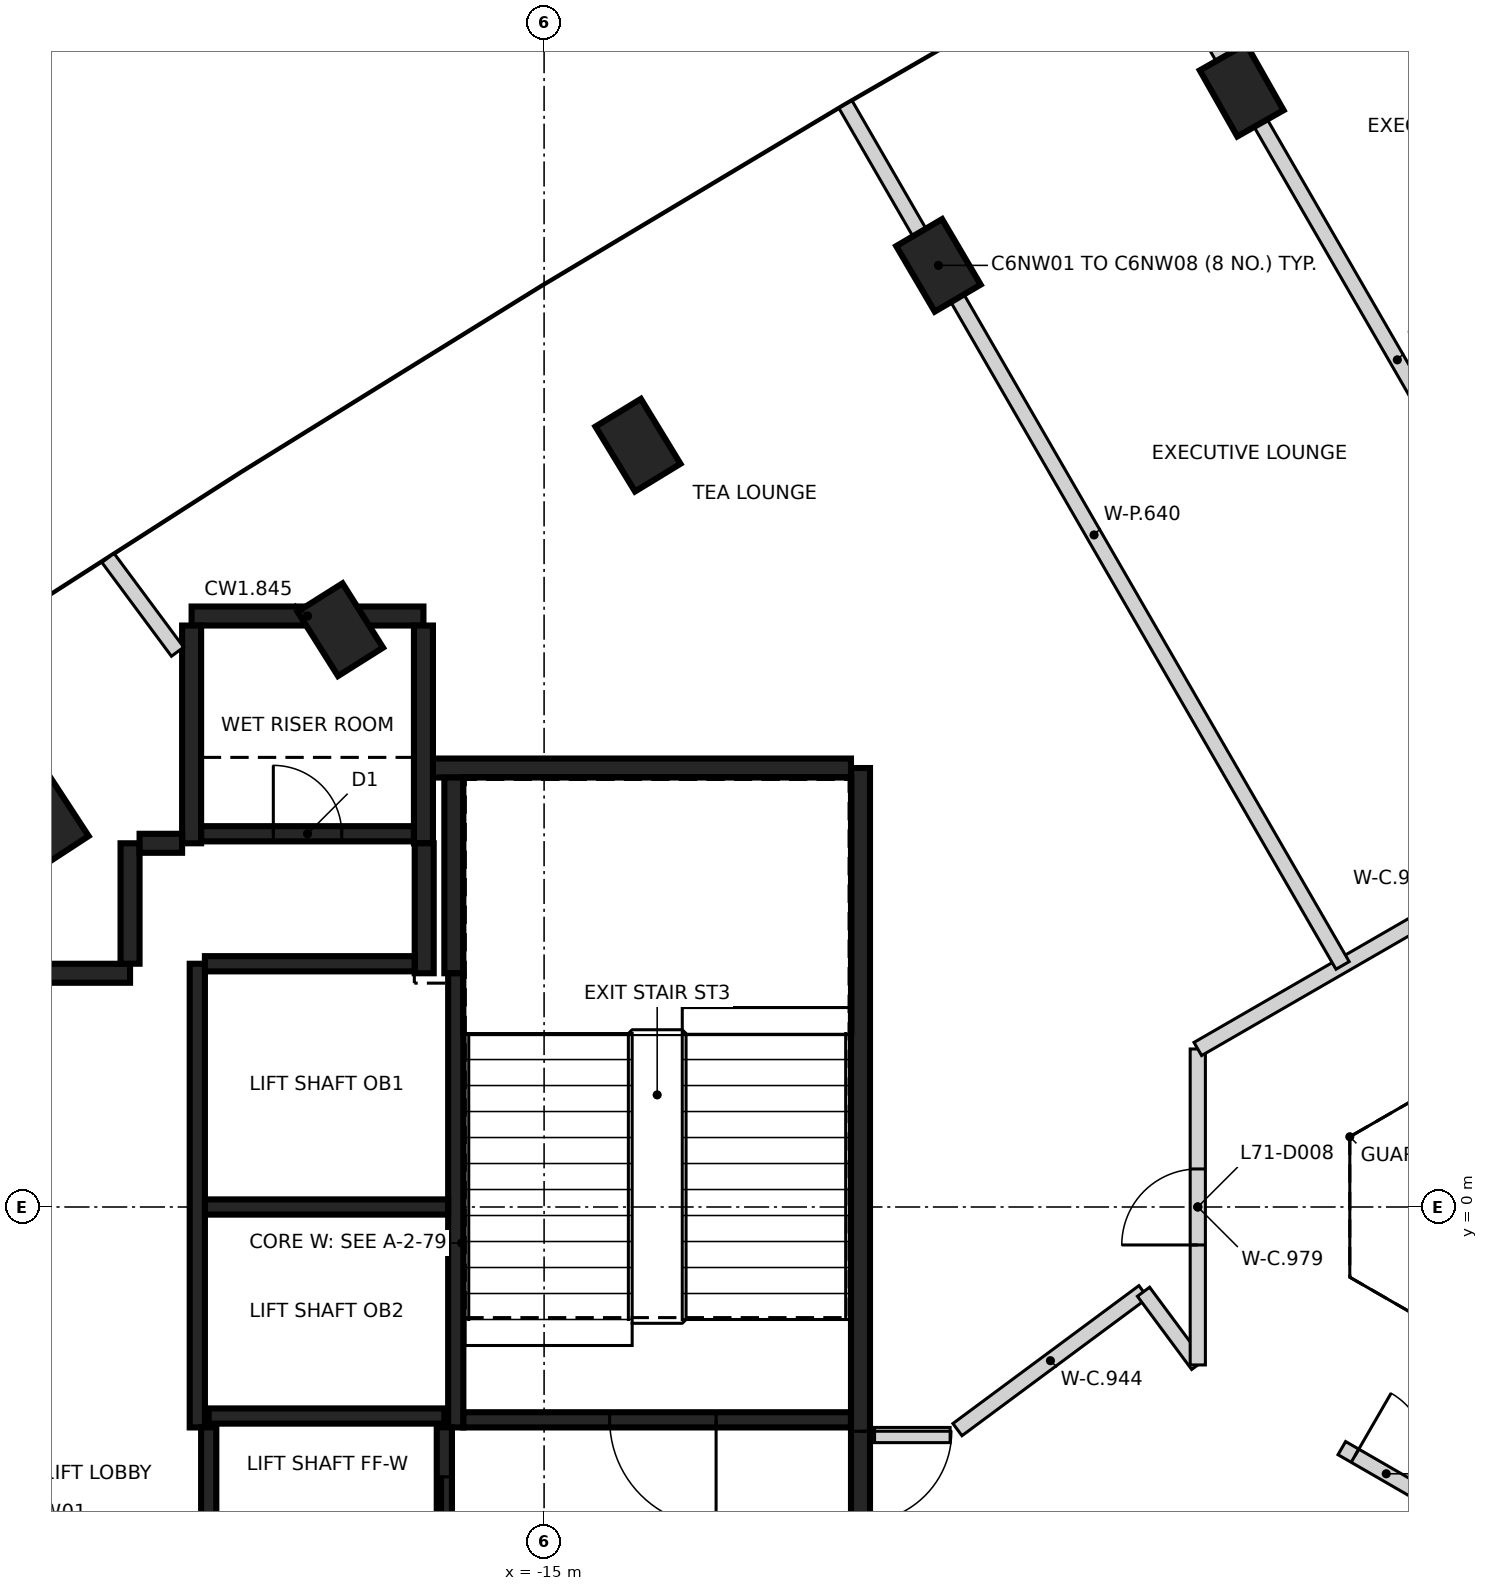
"""IFC4 building model, lengths in metres.
Left out: names, types, materials, properties, quantities, classifications, styles, units other than length and angle.
Written with IfcOpenShell. Run it as: python <this file> out.ifc"""

import sys

from ifc_helpers import new_model, si_unit, direction, frame, frame_2d, origin, origin_2d, place, context, subcontext, project, spatial, rectangle, extrude, element, fill, save


model = new_model("IFC4")
c1 = context("Model", 3, precision=1e-05, world=origin(), true_north=direction((0.0, 1.0)))
c2 = subcontext(c1, "Body", "Model", "MODEL_VIEW")
j1 = project(units=[si_unit("LENGTHUNIT", "METRE"), si_unit("PLANEANGLEUNIT", "RADIAN")], contexts=[c1])
p1 = place(None, origin())
s1 = spatial("IfcSite", under=j1, at=p1, CompositionType="ELEMENT")
p2 = place(p1, origin())
s2 = spatial("IfcBuilding", under=s1, at=p2, CompositionType="ELEMENT")
p3 = place(p2, frame((0.0, 0.0, 280.2)))
s3 = spatial("IfcBuildingStorey", under=s2, at=p3, CompositionType="ELEMENT", Elevation=280.2)
for number, where, z_axis, x_axis in (
    (1, (-5.822, 14.691, -0.35), (0.0, 0.0, 1.0), (-0.493, 0.87, 0.0)),
    (2, (-9.812, 12.388, -0.35), (0.0, 0.0, 1.0), (-0.507, 0.862, 0.0)),
    (3, (-13.765, 10.022, -0.35), (0.0, 0.0, 1.0), (-0.52, 0.854, 0.0)),
    (4, (-17.681, 7.595, -0.35), (0.0, 0.0, 1.0), (-0.533, 0.846, 0.0)),
    (5, (-21.559, 5.107, -0.35), (0.0, 0.0, 1.0), (-0.547, 0.837, 0.0)),
):
    element("IfcColumn", number, at=place(p3, frame(where, z_axis=z_axis, x_axis=x_axis)), inside=s3, PredefinedType="COLUMN", context=c2, shape_type="SweptSolid", body=[
        extrude(rectangle(XDim=1.0, YDim=0.7, at=origin_2d()), origin(), (0.0, 0.0, 1.0), 3.6),
    ])
p4 = place(p3, frame((-10.837, 5.775, 0.0), z_axis=(0.0, 0.0, 1.0), x_axis=(0.0, -1.0, 0.0)))
e6 = element("IfcWall", 6, at=p4, inside=s3, PredefinedType="SHEAR", context=c2, shape_type="SweptSolid", body=[
    extrude(rectangle(XDim=11.55, YDim=0.25, at=frame_2d((5.775, 0.0))), origin(), (0.0, 0.0, 1.0), 3.25),
])
p5 = place(p4, frame((10.025, 0.0, 0.0)))
e7 = element("IfcOpeningElement", 7, at=p5, cuts=e6, PredefinedType="OPENING", context=c2, shape_type="SweptSolid", body=[
    extrude(rectangle(XDim=1.2, YDim=2.1, at=frame_2d((0.6, 1.05))), frame((0.0, 0.135, 0.0), z_axis=(0.0, -1.0, 0.0), x_axis=(1.0, 0.0, 0.0)), (0.0, 0.0, 1.0), 0.27),
])
p6 = place(p4, frame((8.725, 0.0, 0.0)))
e8 = element("IfcOpeningElement", 8, at=p6, cuts=e6, PredefinedType="OPENING", context=c2, shape_type="SweptSolid", body=[
    extrude(rectangle(XDim=1.2, YDim=2.1, at=frame_2d((0.6, 1.05))), frame((0.0, 0.135, 0.0), z_axis=(0.0, -1.0, 0.0), x_axis=(1.0, 0.0, 0.0)), (0.0, 0.0, 1.0), 0.27),
])
p7 = place(p3, frame((-16.472, 5.775, 0.0), z_axis=(0.0, 0.0, 1.0), x_axis=(1.0, 0.0, 0.0)))
e9 = element("IfcWall", 9, at=p7, inside=s3, PredefinedType="SHEAR", context=c2, shape_type="SweptSolid", body=[
    extrude(rectangle(XDim=5.51, YDim=0.25, at=frame_2d((2.755, 0.0))), origin(), (0.0, 0.0, 1.0), 3.25),
])
p8 = place(p3, frame((-19.637, 7.775, 0.0), z_axis=(0.0, 0.0, 1.0), x_axis=(1.0, 0.0, 0.0)))
e10 = element("IfcWall", 10, at=p8, inside=s3, PredefinedType="SHEAR", context=c2, shape_type="SweptSolid", body=[
    extrude(rectangle(XDim=3.05, YDim=0.25, at=frame_2d((1.525, 0.0))), origin(), (0.0, 0.0, 1.0), 3.25),
])
for number, where, z_axis, x_axis in (
    (11, (-16.587, 7.65, 0.0), (0.0, 0.0, 1.0), (0.0, -1.0, 0.0)),
    (12, (-19.637, 4.785, 0.0), (0.0, 0.0, 1.0), (0.0, 1.0, 0.0)),
):
    element("IfcWall", number, at=place(p3, frame(where, z_axis=z_axis, x_axis=x_axis)), inside=s3, PredefinedType="SHEAR", context=c2, shape_type="SweptSolid", body=[
        extrude(rectangle(XDim=2.865, YDim=0.25, at=frame_2d((1.432, 0.0))), origin(), (0.0, 0.0, 1.0), 3.25),
    ])
p9 = place(p3, frame((-16.187, 3.075, 0.0), z_axis=(0.0, 0.0, 1.0), x_axis=(0.0, 1.0, 0.0)))
e13 = element("IfcWall", 13, at=p9, inside=s3, PredefinedType="SHEAR", context=c2, shape_type="SweptSolid", body=[
    extrude(rectangle(XDim=2.575, YDim=0.25, at=frame_2d((1.287, 0.0))), origin(), (0.0, 0.0, 1.0), 3.25),
])
p10 = place(p3, frame((-22.312, 3.075, 0.0), z_axis=(0.0, 0.0, 1.0), x_axis=(1.0, 0.0, 0.0)))
e14 = element("IfcWall", 14, at=p10, inside=s3, PredefinedType="SHEAR", context=c2, shape_type="SweptSolid", body=[
    extrude(rectangle(XDim=1.865, YDim=0.25, at=frame_2d((0.932, 0.0))), origin(), (0.0, 0.0, 1.0), 3.25),
])
p11 = place(p3, frame((-16.577, 4.785, 0.0), z_axis=(0.0, 0.0, 1.0), x_axis=(0.0, -1.0, 0.0)))
e15 = element("IfcWall", 15, at=p11, inside=s3, PredefinedType="SHEAR", context=c2, shape_type="SweptSolid", body=[
    extrude(rectangle(XDim=1.71, YDim=0.25, at=frame_2d((0.855, 0.0))), origin(), (0.0, 0.0, 1.0), 3.25),
])
p12 = place(p3, frame((-20.447, 3.2, 0.0), z_axis=(0.0, 0.0, 1.0), x_axis=(0.0, 1.0, 0.0)))
e16 = element("IfcWall", 16, at=p12, inside=s3, PredefinedType="SHEAR", context=c2, shape_type="SweptSolid", body=[
    extrude(rectangle(XDim=1.584, YDim=0.25, at=frame_2d((0.792, 0.0))), origin(), (0.0, 0.0, 1.0), 3.25),
])
p13 = place(p3, frame((-20.322, 4.785, 0.0), z_axis=(0.0, 0.0, 1.0), x_axis=(1.0, 0.0, 0.0)))
e17 = element("IfcWall", 17, at=p13, inside=s3, PredefinedType="SHEAR", context=c2, shape_type="SweptSolid", body=[
    extrude(rectangle(XDim=0.559, YDim=0.25, at=frame_2d((0.28, 0.0))), origin(), (0.0, 0.0, 1.0), 3.25),
])
p14 = place(p3, frame((-16.162, 3.074, 0.0), z_axis=(0.0, 0.0, 1.0), x_axis=(0.0, -1.0, 0.0)))
e18 = element("IfcWall", 18, at=p14, inside=s3, PredefinedType="SHEAR", context=c2, shape_type="SweptSolid", body=[
    extrude(rectangle(XDim=5.974, YDim=0.2, at=frame_2d((2.987, 0.0))), origin(), (0.0, 0.0, 1.0), 3.25),
])
p15 = place(p3, frame((-19.562, -2.9, 0.0), z_axis=(0.0, 0.0, 1.0), x_axis=(0.0, 1.0, 0.0)))
e19 = element("IfcWall", 19, at=p15, inside=s3, PredefinedType="SHEAR", context=c2, shape_type="SweptSolid", body=[
    extrude(rectangle(XDim=6.1, YDim=0.2, at=frame_2d((3.05, 0.0))), origin(), (0.0, 0.0, 1.0), 3.25),
])
p16 = place(p3, frame((-10.963, -2.8, 0.0), z_axis=(0.0, 0.0, 1.0), x_axis=(-1.0, 0.0, 0.0)))
e20 = element("IfcWall", 20, at=p16, inside=s3, PredefinedType="SHEAR", context=c2, shape_type="SweptSolid", body=[
    extrude(rectangle(XDim=5.098, YDim=0.2, at=frame_2d((2.549, 0.0))), origin(), (0.0, 0.0, 1.0), 3.25),
])
p17 = place(p16, frame((1.774, 0.0, 0.0)))
e21 = element("IfcOpeningElement", 21, at=p17, cuts=e20, PredefinedType="OPENING", context=c2, shape_type="SweptSolid", body=[
    extrude(rectangle(XDim=1.4, YDim=2.1, at=frame_2d((0.7, 1.05))), frame((0.0, 0.11, 0.0), z_axis=(0.0, -1.0, 0.0), x_axis=(1.0, 0.0, 0.0)), (0.0, 0.0, 1.0), 0.22),
])
p18 = place(p3, frame((-16.263, 0.0, 0.0), z_axis=(0.0, 0.0, 1.0), x_axis=(-1.0, 0.0, 0.0)))
e22 = element("IfcWall", 22, at=p18, inside=s3, PredefinedType="SHEAR", context=c2, shape_type="SweptSolid", body=[
    extrude(rectangle(XDim=3.198, YDim=0.2, at=frame_2d((1.599, 0.0))), origin(), (0.0, 0.0, 1.0), 3.25),
])
p19 = place(p3, frame((-19.511, 4.91, 0.0), z_axis=(0.0, 0.0, 1.0), x_axis=(1.0, 0.0, 0.0)))
e23 = element("IfcWall", 23, at=p19, inside=s3, PredefinedType="SHEAR", context=c2, shape_type="SweptSolid", body=[
    extrude(rectangle(XDim=2.798, YDim=0.2, at=frame_2d((1.399, 0.0))), origin(), (0.0, 0.0, 1.0), 3.25),
])
p20 = place(p19, frame((0.949, 0.0, 0.0)))
e24 = element("IfcOpeningElement", 24, at=p20, cuts=e23, PredefinedType="OPENING", context=c2, shape_type="SweptSolid", body=[
    extrude(rectangle(XDim=0.9, YDim=2.1, at=frame_2d((0.45, 1.05))), frame((0.0, 0.11, 0.0), z_axis=(0.0, -1.0, 0.0), x_axis=(1.0, 0.0, 0.0)), (0.0, 0.0, 1.0), 0.22),
])
p21 = place(p3, frame((-19.462, 3.2, 0.0), z_axis=(0.0, 0.0, 1.0), x_axis=(1.0, 0.0, 0.0)))
e25 = element("IfcWall", 25, at=p21, inside=s3, PredefinedType="SHEAR", context=c2, shape_type="SweptSolid", body=[
    extrude(rectangle(XDim=2.759, YDim=0.2, at=frame_2d((1.379, 0.0))), origin(), (0.0, 0.0, 1.0), 3.25),
])
p22 = place(p3, frame((-19.412, -2.75, 0.0), z_axis=(0.0, 0.0, 1.0), x_axis=(1.0, 0.0, 0.0)))
e26 = element("IfcWall", 26, at=p22, inside=s3, PredefinedType="SHEAR", context=c2, shape_type="SweptSolid", body=[
    extrude(rectangle(XDim=3.1, YDim=0.2, at=frame_2d((1.55, 0.0))), origin(), (0.0, 0.0, 1.0), 3.25),
])
p23 = place(p3, frame((-16.312, -2.898, 0.0), z_axis=(0.0, 0.0, 1.0), x_axis=(0.0, -1.0, 0.0)))
e27 = element("IfcWall", 27, at=p23, inside=s3, PredefinedType="SHEAR", context=c2, shape_type="SweptSolid", body=[
    extrude(rectangle(XDim=2.651, YDim=0.2, at=frame_2d((1.325, 0.0))), origin(), (0.0, 0.0, 1.0), 3.25),
])
p24 = place(p23, frame((0.652, 0.0, 0.0)))
e28 = element("IfcOpeningElement", 28, at=p24, cuts=e27, PredefinedType="OPENING", context=c2, shape_type="SweptSolid", body=[
    extrude(rectangle(XDim=1.3, YDim=2.1, at=frame_2d((0.65, 1.05))), frame((0.0, 0.11, 0.0), z_axis=(0.0, -1.0, 0.0), x_axis=(1.0, 0.0, 0.0)), (0.0, 0.0, 1.0), 0.22),
])
p25 = place(p3, frame((-19.412, -5.549, 0.0), z_axis=(0.0, 0.0, 1.0), x_axis=(0.0, 1.0, 0.0)))
e29 = element("IfcWall", 29, at=p25, inside=s3, PredefinedType="SHEAR", context=c2, shape_type="SweptSolid", body=[
    extrude(rectangle(XDim=2.651, YDim=0.2, at=frame_2d((1.325, 0.0))), origin(), (0.0, 0.0, 1.0), 3.25),
])
p26 = place(p3, frame((-10.652, -3.0, 0.0), z_axis=(0.0, 0.0, 1.0), x_axis=(1.0, 0.0, 0.0)))
e30 = element("IfcWall", 30, at=p26, inside=s3, PredefinedType="PARTITIONING", context=c2, shape_type="SweptSolid", body=[
    extrude(rectangle(XDim=0.994, YDim=0.2, at=frame_2d((0.497, 0.0))), origin(), (0.0, 0.0, 1.0), 3.25),
])
p27 = place(p3, frame((-7.115, -1.115, 0.0), z_axis=(0.0, 0.0, 1.0), x_axis=(-0.803344165632, -0.595515030495, 0.0)))
e31 = element("IfcWall", 31, at=p27, inside=s3, PredefinedType="PARTITIONING", context=c2, shape_type="SweptSolid", body=[
    extrude(rectangle(XDim=3.046, YDim=0.2, at=frame_2d((1.523, 0.0))), origin(), (0.0, 0.0, 1.0), 3.25),
])
p28 = place(p3, frame((-7.114, -1.115, 0.0), z_axis=(0.0, 0.0, 1.0), x_axis=(0.595690139668, -0.803214328496, 0.0)))
e32 = element("IfcWall", 32, at=p28, inside=s3, PredefinedType="PARTITIONING", context=c2, shape_type="SweptSolid", body=[
    extrude(rectangle(XDim=1.199, YDim=0.2, at=frame_2d((0.599, 0.0))), origin(), (0.0, 0.0, 1.0), 3.25),
])
p29 = place(p3, frame((-6.4, -2.078, 0.0), z_axis=(0.0, 0.0, 1.0), x_axis=(0.0, 1.0, 0.0)))
e33 = element("IfcWall", 33, at=p29, inside=s3, PredefinedType="PARTITIONING", context=c2, shape_type="SweptSolid", body=[
    extrude(rectangle(XDim=4.157, YDim=0.2, at=frame_2d((2.079, 0.0))), origin(), (0.0, 0.0, 1.0), 3.25),
])
p30 = place(p29, frame((1.579, 0.0, 0.0)))
e34 = element("IfcOpeningElement", 34, at=p30, cuts=e33, PredefinedType="OPENING", context=c2, shape_type="SweptSolid", body=[
    extrude(rectangle(XDim=1.0, YDim=2.1, at=frame_2d((0.5, 1.05))), frame((0.0, 0.11, 0.0), z_axis=(0.0, -1.0, 0.0), x_axis=(1.0, 0.0, 0.0)), (0.0, 0.0, 1.0), 0.22),
])
p31 = place(p3, frame((-6.4, 2.079, 0.0), z_axis=(0.0, 0.0, 1.0), x_axis=(0.866044821263, 0.499966366432, 0.0)))
e35 = element("IfcWall", 35, at=p31, inside=s3, PredefinedType="PARTITIONING", context=c2, shape_type="SweptSolid", body=[
    extrude(rectangle(XDim=8.953, YDim=0.2, at=frame_2d((4.477, 0.0))), origin(), (0.0, 0.0, 1.0), 3.25),
])
p32 = place(p31, frame((4.003, 0.0, 0.0)))
e36 = element("IfcOpeningElement", 36, at=p32, cuts=e35, PredefinedType="OPENING", context=c2, shape_type="SweptSolid", body=[
    extrude(rectangle(XDim=1.0, YDim=2.1, at=frame_2d((0.5, 1.05))), frame((0.0, 0.11, 0.0), z_axis=(0.0, -1.0, 0.0), x_axis=(1.0, 0.0, 0.0)), (0.0, 0.0, 1.0), 0.22),
])
p33 = place(p3, frame((-4.505, -3.172, 0.0), z_axis=(0.0, 0.0, 1.0), x_axis=(0.865815783666, -0.500362897061, 0.0)))
e37 = element("IfcWall", 37, at=p33, inside=s3, PredefinedType="PARTITIONING", context=c2, shape_type="SweptSolid", body=[
    extrude(rectangle(XDim=6.819, YDim=0.2, at=frame_2d((3.409, 0.0))), origin(), (0.0, 0.0, 1.0), 3.25),
])
p34 = place(p33, frame((0.2, 0.0, 0.0)))
e38 = element("IfcOpeningElement", 38, at=p34, cuts=e37, PredefinedType="OPENING", context=c2, shape_type="SweptSolid", body=[
    extrude(rectangle(XDim=0.95, YDim=2.1, at=frame_2d((0.475, 1.05))), frame((0.0, 0.11, 0.0), z_axis=(0.0, -1.0, 0.0), x_axis=(1.0, 0.0, 0.0)), (0.0, 0.0, 1.0), 0.22),
])
p35 = place(p3, frame((-20.738, 8.539, 0.0), z_axis=(0.0, 0.0, 1.0), x_axis=(0.595694844153, -0.803210839475, 0.0)))
e39 = element("IfcWall", 39, at=p35, inside=s3, PredefinedType="PARTITIONING", context=c2, shape_type="SweptSolid", body=[
    extrude(rectangle(XDim=1.536, YDim=0.2, at=frame_2d((0.768, 0.0))), origin(), (0.0, 0.0, 1.0), 3.25),
])
p36 = place(p3, frame((-11.035, 14.505, 0.0), z_axis=(0.0, 0.0, 1.0), x_axis=(0.499989597041, -0.866031409852, 0.0)))
e40 = element("IfcWall", 40, at=p36, inside=s3, PredefinedType="PARTITIONING", context=c2, shape_type="SweptSolid", body=[
    extrude(rectangle(XDim=13.079, YDim=0.2, at=frame_2d((6.54, 0.0))), origin(), (0.0, 0.0, 1.0), 3.25),
])
p37 = place(p3, frame((-7.044, 16.809, 0.0), z_axis=(0.0, 0.0, 1.0), x_axis=(0.499997679687, -0.866026743414, 0.0)))
e41 = element("IfcWall", 41, at=p37, inside=s3, PredefinedType="PARTITIONING", context=c2, shape_type="SweptSolid", body=[
    extrude(rectangle(XDim=13.079, YDim=0.2, at=frame_2d((6.54, 0.0))), origin(), (0.0, 0.0, 1.0), 3.25),
])
p38 = place(p3, frame((-4.303, -6.06, 0.0), z_axis=(0.0, 0.0, 1.0), x_axis=(0.500045362686, 0.865999212041, 0.0)))
e42 = element("IfcWall", 42, at=p38, inside=s3, PredefinedType="PARTITIONING", context=c2, shape_type="SweptSolid", body=[
    extrude(rectangle(XDim=2.4, YDim=0.15, at=frame_2d((1.2, 0.0))), origin(), (0.0, 0.0, 1.0), 3.25),
])
p39 = place(p38, frame((0.8, 0.0, 0.0)))
e43 = element("IfcOpeningElement", 43, at=p39, cuts=e42, PredefinedType="OPENING", context=c2, shape_type="SweptSolid", body=[
    extrude(rectangle(XDim=0.8, YDim=2.1, at=frame_2d((0.4, 1.05))), frame((0.0, 0.085, 0.0), z_axis=(0.0, -1.0, 0.0), x_axis=(1.0, 0.0, 0.0)), (0.0, 0.0, 1.0), 0.17),
])
p40 = place(p24, origin())
e44 = element("IfcDoor", 44, at=p40, inside=s3, OperationType="SLIDING_TO_LEFT", PredefinedType="DOOR", context=c2, shape_type="SweptSolid", body=[
    extrude(rectangle(XDim=1.3, YDim=2.1, at=frame_2d((0.65, 1.05))), frame((0.0, 0.025, 0.0), z_axis=(0.0, -1.0, 0.0), x_axis=(1.0, 0.0, 0.0)), (0.0, 0.0, 1.0), 0.05),
])
fill(e28, e44)
p41 = place(p6, origin())
e45 = element("IfcDoor", 45, at=p41, inside=s3, OperationType="SINGLE_SWING_RIGHT", PredefinedType="DOOR", context=c2, shape_type="SweptSolid", body=[
    extrude(rectangle(XDim=1.2, YDim=2.1, at=frame_2d((0.6, 1.05))), frame((0.0, 0.025, 0.0), z_axis=(0.0, -1.0, 0.0), x_axis=(1.0, 0.0, 0.0)), (0.0, 0.0, 1.0), 0.05),
])
fill(e8, e45)
p42 = place(p17, origin())
e46 = element("IfcDoor", 46, at=p42, inside=s3, OperationType="SINGLE_SWING_LEFT", PredefinedType="DOOR", context=c2, shape_type="SweptSolid", body=[
    extrude(rectangle(XDim=1.4, YDim=2.1, at=frame_2d((0.7, 1.05))), frame((0.0, 0.025, 0.0), z_axis=(0.0, -1.0, 0.0), x_axis=(1.0, 0.0, 0.0)), (0.0, 0.0, 1.0), 0.05),
])
fill(e21, e46)
p43 = place(p20, origin())
e47 = element("IfcDoor", 47, at=p43, inside=s3, OperationType="SINGLE_SWING_RIGHT", PredefinedType="DOOR", context=c2, shape_type="SweptSolid", body=[
    extrude(rectangle(XDim=0.9, YDim=2.1, at=frame_2d((0.45, 1.05))), frame((0.0, 0.025, 0.0), z_axis=(0.0, -1.0, 0.0), x_axis=(1.0, 0.0, 0.0)), (0.0, 0.0, 1.0), 0.05),
])
fill(e24, e47)
p44 = place(p30, origin())
e48 = element("IfcDoor", 48, at=p44, inside=s3, OperationType="SINGLE_SWING_LEFT", PredefinedType="DOOR", context=c2, shape_type="SweptSolid", body=[
    extrude(rectangle(XDim=1.0, YDim=2.1, at=frame_2d((0.5, 1.05))), frame((0.0, 0.025, 0.0), z_axis=(0.0, -1.0, 0.0), x_axis=(1.0, 0.0, 0.0)), (0.0, 0.0, 1.0), 0.05),
])
fill(e34, e48)
p45 = place(p34, frame((0.95, 0.0, 0.0), z_axis=(0.0, 0.0, 1.0), x_axis=(-1.0, 0.0, 0.0)))
e49 = element("IfcDoor", 49, at=p45, inside=s3, OperationType="SINGLE_SWING_LEFT", PredefinedType="DOOR", context=c2, shape_type="SweptSolid", body=[
    extrude(rectangle(XDim=0.95, YDim=2.1, at=frame_2d((0.475, 1.05))), frame((0.0, 0.025, 0.0), z_axis=(0.0, -1.0, 0.0), x_axis=(1.0, 0.0, 0.0)), (0.0, 0.0, 1.0), 0.05),
])
fill(e38, e49)
save(model, sys.argv[1])
